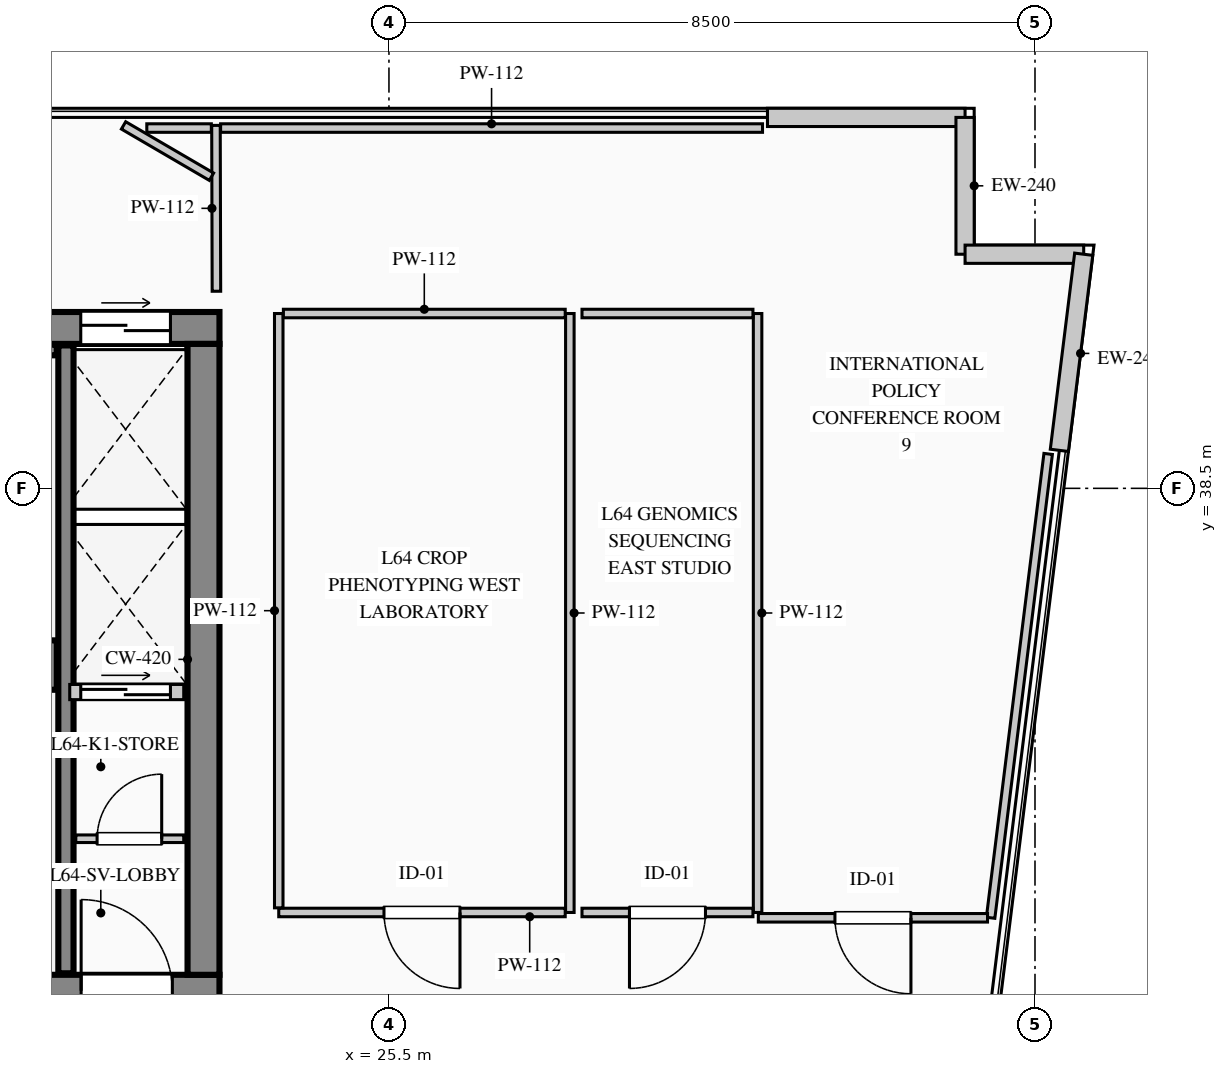
"""IFC4 building model, lengths in metres.
Left out: names, types, materials, properties, quantities, classifications, styles, units other than length and angle.
Written with IfcOpenShell. Run it as: python <this file> out.ifc"""

import sys

from ifc_helpers import new_model, si_unit, direction, frame, frame_2d, origin, place, context, subcontext, project, spatial, rectangle, extrude, element, fill, save


model = new_model("IFC4")
c1 = context("Model", 3, precision=1e-05, world=origin(), true_north=direction((0.0, 1.0)))
c2 = subcontext(c1, "Body", "Model", "MODEL_VIEW")
j1 = project(units=[si_unit("LENGTHUNIT", "METRE"), si_unit("PLANEANGLEUNIT", "RADIAN")], contexts=[c1])
p1 = place(None, origin())
s1 = spatial("IfcSite", under=j1, at=p1, CompositionType="ELEMENT")
p2 = place(p1, origin())
s2 = spatial("IfcBuilding", under=s1, at=p2, CompositionType="ELEMENT")
p3 = place(p2, frame((0.0, 0.0, 268.55)))
s3 = spatial("IfcBuildingStorey", under=s2, at=p3, CompositionType="ELEMENT", Elevation=268.55)
p4 = place(p3, frame((5.58, 40.61, 0.0), z_axis=(0.0, 0.0, 1.0), x_axis=(1.0, 0.0, 0.0)))
e1 = element("IfcWall", 1, at=p4, inside=s3, PredefinedType="SHEAR", context=c2, shape_type="SweptSolid", body=[
    extrude(rectangle(XDim=17.69, YDim=0.42, at=frame_2d((8.845, 0.0))), origin(), (0.0, 0.0, 1.0), 3.95),
])
p5 = place(p4, frame((15.865, 0.0, 0.0)))
e2 = element("IfcOpeningElement", 2, at=p5, cuts=e1, PredefinedType="OPENING", context=c2, shape_type="SweptSolid", body=[
    extrude(rectangle(XDim=1.18, YDim=2.25, at=frame_2d((0.59, 1.125))), frame((0.0, 0.22, 0.0), z_axis=(0.0, -1.0, 0.0), x_axis=(1.0, 0.0, 0.0)), (0.0, 0.0, 1.0), 0.44),
])
p6 = place(p3, frame((5.58, 31.89, 0.0), z_axis=(0.0, 0.0, 1.0), x_axis=(1.0, 0.0, 0.0)))
e3 = element("IfcWall", 3, at=p6, inside=s3, PredefinedType="SHEAR", context=c2, shape_type="SweptSolid", body=[
    extrude(rectangle(XDim=17.69, YDim=0.42, at=frame_2d((8.845, 0.0))), origin(), (0.0, 0.0, 1.0), 3.95),
])
p7 = place(p6, frame((3.07, 0.0, 0.0)))
e4 = element("IfcOpeningElement", 4, at=p7, cuts=e3, PredefinedType="OPENING", context=c2, shape_type="SweptSolid", body=[
    extrude(rectangle(XDim=1.2, YDim=2.2, at=frame_2d((0.6, 1.1))), frame((0.0, 0.22, 0.0), z_axis=(0.0, -1.0, 0.0), x_axis=(1.0, 0.0, 0.0)), (0.0, 0.0, 1.0), 0.44),
])
p8 = place(p6, frame((6.92, 0.0, 0.0)))
e5 = element("IfcOpeningElement", 5, at=p8, cuts=e3, PredefinedType="OPENING", context=c2, shape_type="SweptSolid", body=[
    extrude(rectangle(XDim=1.2, YDim=2.2, at=frame_2d((0.6, 1.1))), frame((0.0, 0.22, 0.0), z_axis=(0.0, -1.0, 0.0), x_axis=(1.0, 0.0, 0.0)), (0.0, 0.0, 1.0), 0.44),
])
p9 = place(p6, frame((8.77, 0.0, 0.0)))
e6 = element("IfcOpeningElement", 6, at=p9, cuts=e3, PredefinedType="OPENING", context=c2, shape_type="SweptSolid", body=[
    extrude(rectangle(XDim=1.15, YDim=2.2, at=frame_2d((0.575, 1.1))), frame((0.0, 0.22, 0.0), z_axis=(0.0, -1.0, 0.0), x_axis=(1.0, 0.0, 0.0)), (0.0, 0.0, 1.0), 0.44),
])
p10 = place(p6, frame((15.87, 0.0, 0.0)))
e7 = element("IfcOpeningElement", 7, at=p10, cuts=e3, PredefinedType="OPENING", context=c2, shape_type="SweptSolid", body=[
    extrude(rectangle(XDim=1.2, YDim=2.2, at=frame_2d((0.6, 1.1))), frame((0.0, 0.22, 0.0), z_axis=(0.0, -1.0, 0.0), x_axis=(1.0, 0.0, 0.0)), (0.0, 0.0, 1.0), 0.44),
])
p11 = place(p3, frame((23.06, 32.1, 0.0), z_axis=(0.0, 0.0, 1.0), x_axis=(0.0, 1.0, 0.0)))
e8 = element("IfcWall", 8, at=p11, inside=s3, PredefinedType="SHEAR", context=c2, shape_type="SweptSolid", body=[
    extrude(rectangle(XDim=8.3, YDim=0.42, at=frame_2d((4.15, 0.0))), origin(), (0.0, 0.0, 1.0), 3.95),
])
p12 = place(p3, frame((14.12, 36.175, 0.0), z_axis=(0.0, 0.0, 1.0), x_axis=(1.0, 0.0, 0.0)))
e9 = element("IfcWall", 9, at=p12, inside=s3, PredefinedType="SHEAR", context=c2, shape_type="SweptSolid", body=[
    extrude(rectangle(XDim=7.01, YDim=0.65, at=frame_2d((3.505, 0.0))), origin(), (0.0, 0.0, 1.0), 3.95),
])
p13 = place(p3, frame((21.25, 32.12, 0.0), z_axis=(0.0, 0.0, 1.0), x_axis=(0.0, 1.0, 0.0)))
e10 = element("IfcWall", 10, at=p13, inside=s3, PredefinedType="SHEAR", context=c2, shape_type="SweptSolid", body=[
    extrude(rectangle(XDim=8.26, YDim=0.2, at=frame_2d((4.13, 0.0))), origin(), (0.0, 0.0, 1.0), 3.95),
])
p14 = place(p3, frame((14.12, 40.32, 0.0), z_axis=(0.0, 0.0, 1.0), x_axis=(1.0, 0.0, 0.0)))
e11 = element("IfcWall", 11, at=p14, inside=s3, PredefinedType="SHEAR", context=c2, shape_type="SweptSolid", body=[
    extrude(rectangle(XDim=7.01, YDim=0.14, at=frame_2d((3.505, 0.0))), origin(), (0.0, 0.0, 1.0), 3.95),
])
p15 = place(p3, frame((30.48, 43.38, 0.0), z_axis=(0.0, 0.0, 1.0), x_axis=(1.0, 0.0, 0.0)))
e12 = element("IfcWall", 12, at=p15, inside=s3, PredefinedType="STANDARD", context=c2, shape_type="SweptSolid", body=[
    extrude(rectangle(XDim=2.6, YDim=0.24, at=frame_2d((1.3, 0.0))), origin(), (0.0, 0.0, 1.0), 3.7),
])
p16 = place(p3, frame((33.08, 43.38, 0.0), z_axis=(0.0, 0.0, 1.0), x_axis=(0.0, -1.0, 0.0)))
e13 = element("IfcWall", 13, at=p16, inside=s3, PredefinedType="STANDARD", context=c2, shape_type="SweptSolid", body=[
    extrude(rectangle(XDim=1.8, YDim=0.24, at=frame_2d((0.9, 0.0))), origin(), (0.0, 0.0, 1.0), 3.7),
])
p17 = place(p3, frame((33.08, 41.58, 0.0), z_axis=(0.0, 0.0, 1.0), x_axis=(1.0, 0.0, 0.0)))
e14 = element("IfcWall", 14, at=p17, inside=s3, PredefinedType="STANDARD", context=c2, shape_type="SweptSolid", body=[
    extrude(rectangle(XDim=1.561, YDim=0.24, at=frame_2d((0.78, 0.0))), origin(), (0.0, 0.0, 1.0), 3.7),
])
p18 = place(p3, frame((34.641, 41.58, 0.0), z_axis=(0.0, 0.0, 1.0), x_axis=(-0.123191073593, -0.992382970121, 0.0)))
e15 = element("IfcWall", 15, at=p18, inside=s3, PredefinedType="STANDARD", context=c2, shape_type="SweptSolid", body=[
    extrude(rectangle(XDim=2.6, YDim=0.24, at=frame_2d((1.3, 0.0))), origin(), (0.0, 0.0, 1.0), 3.7),
])
p19 = place(p3, frame((21.38, 33.89, 0.0), z_axis=(0.0, 0.0, 1.0), x_axis=(1.0, 0.0, 0.0)))
e16 = element("IfcWall", 16, at=p19, inside=s3, PredefinedType="PARTITIONING", context=c2, shape_type="SweptSolid", body=[
    extrude(rectangle(XDim=1.42, YDim=0.1, at=frame_2d((0.71, 0.0))), origin(), (0.0, 0.0, 1.0), 3.7),
])
p20 = place(p19, frame((0.28, 0.0, 0.0)))
e17 = element("IfcOpeningElement", 17, at=p20, cuts=e16, PredefinedType="OPENING", context=c2, shape_type="SweptSolid", body=[
    extrude(rectangle(XDim=0.85, YDim=2.1, at=frame_2d((0.425, 1.05))), frame((0.0, 0.06, 0.0), z_axis=(0.0, -1.0, 0.0), x_axis=(1.0, 0.0, 0.0)), (0.0, 0.0, 1.0), 0.12),
])
p21 = place(p3, frame((21.3, 35.82, 0.0), z_axis=(0.0, 0.0, 1.0), x_axis=(1.0, 0.0, 0.0)))
e18 = element("IfcWall", 18, at=p21, inside=s3, PredefinedType="PARTITIONING", context=c2, shape_type="SweptSolid", body=[
    extrude(rectangle(XDim=1.5, YDim=0.2, at=frame_2d((0.75, 0.0))), origin(), (0.0, 0.0, 1.0), 3.7),
])
p22 = place(p21, frame((0.145, 0.0, 0.0)))
e19 = element("IfcOpeningElement", 19, at=p22, cuts=e18, PredefinedType="OPENING", context=c2, shape_type="SweptSolid", body=[
    extrude(rectangle(XDim=1.18, YDim=2.25, at=frame_2d((0.59, 1.125))), frame((0.0, 0.11, 0.0), z_axis=(0.0, -1.0, 0.0), x_axis=(1.0, 0.0, 0.0)), (0.0, 0.0, 1.0), 0.22),
])
p23 = place(p3, frame((27.88, 40.8, 0.0), z_axis=(0.0, 0.0, 1.0), x_axis=(0.0, -1.0, 0.0)))
e20 = element("IfcWall", 20, at=p23, inside=s3, PredefinedType="PARTITIONING", context=c2, shape_type="SweptSolid", body=[
    extrude(rectangle(XDim=7.88, YDim=0.112, at=frame_2d((3.94, 0.0))), origin(), (0.0, 0.0, 1.0), 3.7),
])
p24 = place(p3, frame((27.819, 32.92, 0.0), z_axis=(0.0, 0.0, 1.0), x_axis=(-1.0, 0.0, 0.0)))
e21 = element("IfcWall", 21, at=p24, inside=s3, PredefinedType="PARTITIONING", context=c2, shape_type="SweptSolid", body=[
    extrude(rectangle(XDim=3.769, YDim=0.112, at=frame_2d((1.885, 0.0))), origin(), (0.0, 0.0, 1.0), 3.7),
])
p25 = place(p24, frame((1.385, 0.0, 0.0)))
e22 = element("IfcOpeningElement", 22, at=p25, cuts=e21, PredefinedType="OPENING", context=c2, shape_type="SweptSolid", body=[
    extrude(rectangle(XDim=1.0, YDim=2.15, at=frame_2d((0.5, 1.075))), frame((0.0, 0.066, 0.0), z_axis=(0.0, -1.0, 0.0), x_axis=(1.0, 0.0, 0.0)), (0.0, 0.0, 1.0), 0.132),
])
p26 = place(p3, frame((24.05, 32.981, 0.0), z_axis=(0.0, 0.0, 1.0), x_axis=(0.0, 1.0, 0.0)))
e23 = element("IfcWall", 23, at=p26, inside=s3, PredefinedType="PARTITIONING", context=c2, shape_type="SweptSolid", body=[
    extrude(rectangle(XDim=7.819, YDim=0.112, at=frame_2d((3.91, 0.0))), origin(), (0.0, 0.0, 1.0), 3.7),
])
p27 = place(p3, frame((24.111, 40.8, 0.0), z_axis=(0.0, 0.0, 1.0), x_axis=(1.0, 0.0, 0.0)))
e24 = element("IfcWall", 24, at=p27, inside=s3, PredefinedType="PARTITIONING", context=c2, shape_type="SweptSolid", body=[
    extrude(rectangle(XDim=3.708, YDim=0.112, at=frame_2d((1.854, 0.0))), origin(), (0.0, 0.0, 1.0), 3.7),
])
p28 = place(p3, frame((30.35, 40.8, 0.0), z_axis=(0.0, 0.0, 1.0), x_axis=(0.0, -1.0, 0.0)))
e25 = element("IfcWall", 25, at=p28, inside=s3, PredefinedType="PARTITIONING", context=c2, shape_type="SweptSolid", body=[
    extrude(rectangle(XDim=7.88, YDim=0.112, at=frame_2d((3.94, 0.0))), origin(), (0.0, 0.0, 1.0), 3.7),
])
p29 = place(p3, frame((30.289, 32.92, 0.0), z_axis=(0.0, 0.0, 1.0), x_axis=(-1.0, 0.0, 0.0)))
e26 = element("IfcWall", 26, at=p29, inside=s3, PredefinedType="PARTITIONING", context=c2, shape_type="SweptSolid", body=[
    extrude(rectangle(XDim=2.249, YDim=0.112, at=frame_2d((1.125, 0.0))), origin(), (0.0, 0.0, 1.0), 3.7),
])
p30 = place(p29, frame((0.625, 0.0, 0.0)))
e27 = element("IfcOpeningElement", 27, at=p30, cuts=e26, PredefinedType="OPENING", context=c2, shape_type="SweptSolid", body=[
    extrude(rectangle(XDim=1.0, YDim=2.15, at=frame_2d((0.5, 1.075))), frame((0.0, 0.066, 0.0), z_axis=(0.0, -1.0, 0.0), x_axis=(1.0, 0.0, 0.0)), (0.0, 0.0, 1.0), 0.132),
])
p31 = place(p3, frame((28.04, 40.8, 0.0), z_axis=(0.0, 0.0, 1.0), x_axis=(1.0, 0.0, 0.0)))
e28 = element("IfcWall", 28, at=p31, inside=s3, PredefinedType="PARTITIONING", context=c2, shape_type="SweptSolid", body=[
    extrude(rectangle(XDim=2.249, YDim=0.112, at=frame_2d((1.125, 0.0))), origin(), (0.0, 0.0, 1.0), 3.7),
])
p32 = place(p3, frame((23.23, 41.093, 0.0), z_axis=(0.0, 0.0, 1.0), x_axis=(-0.002685455238, 0.999996394159, 0.0)))
e29 = element("IfcWall", 29, at=p32, inside=s3, PredefinedType="PARTITIONING", context=c2, shape_type="SweptSolid", body=[
    extrude(rectangle(XDim=2.182, YDim=0.112, at=frame_2d((1.091, 0.0))), origin(), (0.0, 0.0, 1.0), 3.7),
])
p33 = place(p3, frame((23.165, 42.6, 0.0), z_axis=(0.0, 0.0, 1.0), x_axis=(-0.863606966756, 0.504165654295, 0.0)))
e30 = element("IfcWall", 30, at=p33, inside=s3, PredefinedType="PARTITIONING", context=c2, shape_type="SweptSolid", body=[
    extrude(rectangle(XDim=1.339, YDim=0.112, at=frame_2d((0.67, 0.0))), origin(), (0.0, 0.0, 1.0), 3.7),
])
p34 = place(p3, frame((22.314, 43.24, 0.0), z_axis=(0.0, 0.0, 1.0), x_axis=(1.0, 0.0, 0.0)))
e31 = element("IfcWall", 31, at=p34, inside=s3, PredefinedType="PARTITIONING", context=c2, shape_type="SweptSolid", body=[
    extrude(rectangle(XDim=0.849, YDim=0.112, at=frame_2d((0.425, 0.0))), origin(), (0.0, 0.0, 1.0), 3.7),
])
p35 = place(p3, frame((23.285, 43.24, 0.0), z_axis=(0.0, 0.0, 1.0), x_axis=(1.0, 0.0, 0.0)))
e32 = element("IfcWall", 32, at=p35, inside=s3, PredefinedType="PARTITIONING", context=c2, shape_type="SweptSolid", body=[
    extrude(rectangle(XDim=7.13, YDim=0.112, at=frame_2d((3.565, 0.0))), origin(), (0.0, 0.0, 1.0), 3.7),
])
p36 = place(p3, frame((34.173, 38.953, 0.0), z_axis=(0.0, 0.0, 1.0), x_axis=(-0.123155137196, -0.992387430484, 0.0)))
e33 = element("IfcWall", 33, at=p36, inside=s3, PredefinedType="PARTITIONING", context=c2, shape_type="SweptSolid", body=[
    extrude(rectangle(XDim=6.149, YDim=0.112, at=frame_2d((3.075, 0.0))), origin(), (0.0, 0.0, 1.0), 3.7),
])
p37 = place(p3, frame((33.375, 32.85, 0.0), z_axis=(0.0, 0.0, 1.0), x_axis=(-1.0, 0.0, 0.0)))
e34 = element("IfcWall", 34, at=p37, inside=s3, PredefinedType="PARTITIONING", context=c2, shape_type="SweptSolid", body=[
    extrude(rectangle(XDim=3.015, YDim=0.112, at=frame_2d((1.508, 0.0))), origin(), (0.0, 0.0, 1.0), 3.7),
])
p38 = place(p37, frame((1.008, 0.0, 0.0)))
e35 = element("IfcOpeningElement", 35, at=p38, cuts=e34, PredefinedType="OPENING", context=c2, shape_type="SweptSolid", body=[
    extrude(rectangle(XDim=1.0, YDim=2.15, at=frame_2d((0.5, 1.075))), frame((0.0, 0.066, 0.0), z_axis=(0.0, -1.0, 0.0), x_axis=(1.0, 0.0, 0.0)), (0.0, 0.0, 1.0), 0.132),
])
p39 = place(p10, origin())
e36 = element("IfcDoor", 36, at=p39, inside=s3, OperationType="SINGLE_SWING_LEFT", PredefinedType="DOOR", context=c2, shape_type="SweptSolid", body=[
    extrude(rectangle(XDim=1.2, YDim=2.2, at=frame_2d((0.6, 1.1))), frame((0.0, 0.025, 0.0), z_axis=(0.0, -1.0, 0.0), x_axis=(1.0, 0.0, 0.0)), (0.0, 0.0, 1.0), 0.05),
])
fill(e7, e36)
p40 = place(p20, origin())
e37 = element("IfcDoor", 37, at=p40, inside=s3, OperationType="SINGLE_SWING_RIGHT", PredefinedType="DOOR", context=c2, shape_type="SweptSolid", body=[
    extrude(rectangle(XDim=0.85, YDim=2.1, at=frame_2d((0.425, 1.05))), frame((0.0, 0.025, 0.0), z_axis=(0.0, -1.0, 0.0), x_axis=(1.0, 0.0, 0.0)), (0.0, 0.0, 1.0), 0.05),
])
fill(e17, e37)
p41 = place(p5, origin())
e38 = element("IfcDoor", 38, at=p41, inside=s3, OperationType="DOUBLE_DOOR_SLIDING", PredefinedType="DOOR", context=c2, shape_type="SweptSolid", body=[
    extrude(rectangle(XDim=1.18, YDim=2.25, at=frame_2d((0.59, 1.125))), frame((0.0, 0.025, 0.0), z_axis=(0.0, -1.0, 0.0), x_axis=(1.0, 0.0, 0.0)), (0.0, 0.0, 1.0), 0.05),
])
fill(e2, e38)
p42 = place(p22, origin())
e39 = element("IfcDoor", 39, at=p42, inside=s3, OperationType="DOUBLE_DOOR_SLIDING", PredefinedType="DOOR", context=c2, shape_type="SweptSolid", body=[
    extrude(rectangle(XDim=1.18, YDim=2.25, at=frame_2d((0.59, 1.125))), frame((0.0, 0.025, 0.0), z_axis=(0.0, -1.0, 0.0), x_axis=(1.0, 0.0, 0.0)), (0.0, 0.0, 1.0), 0.05),
])
fill(e19, e39)
p43 = place(p25, origin())
e40 = element("IfcDoor", 40, at=p43, inside=s3, OperationType="SINGLE_SWING_LEFT", PredefinedType="DOOR", context=c2, shape_type="SweptSolid", body=[
    extrude(rectangle(XDim=1.0, YDim=2.15, at=frame_2d((0.5, 1.075))), frame((0.0, 0.025, 0.0), z_axis=(0.0, -1.0, 0.0), x_axis=(1.0, 0.0, 0.0)), (0.0, 0.0, 1.0), 0.05),
])
fill(e22, e40)
p44 = place(p30, origin())
e41 = element("IfcDoor", 41, at=p44, inside=s3, OperationType="SINGLE_SWING_RIGHT", PredefinedType="DOOR", context=c2, shape_type="SweptSolid", body=[
    extrude(rectangle(XDim=1.0, YDim=2.15, at=frame_2d((0.5, 1.075))), frame((0.0, 0.025, 0.0), z_axis=(0.0, -1.0, 0.0), x_axis=(1.0, 0.0, 0.0)), (0.0, 0.0, 1.0), 0.05),
])
fill(e27, e41)
p45 = place(p38, origin())
e42 = element("IfcDoor", 42, at=p45, inside=s3, OperationType="SINGLE_SWING_LEFT", PredefinedType="DOOR", context=c2, shape_type="SweptSolid", body=[
    extrude(rectangle(XDim=1.0, YDim=2.15, at=frame_2d((0.5, 1.075))), frame((0.0, 0.025, 0.0), z_axis=(0.0, -1.0, 0.0), x_axis=(1.0, 0.0, 0.0)), (0.0, 0.0, 1.0), 0.05),
])
fill(e35, e42)
save(model, sys.argv[1])
